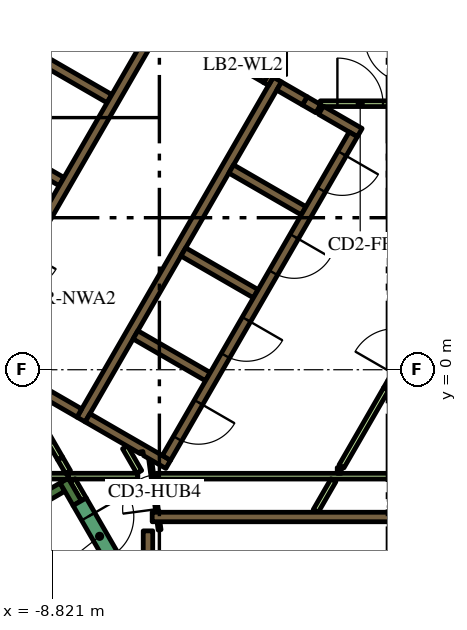
"""IFC4 building model, lengths in metres.
Left out: names, types, materials, properties, quantities, classifications, styles, units other than length and angle.
Written with IfcOpenShell. Run it as: python <this file> out.ifc"""

import sys

from ifc_helpers import new_model, si_unit, direction, frame, frame_2d, origin, place, context, subcontext, project, spatial, polyline, rectangle, outline, extrude, element, fill, save


model = new_model("IFC4")
c1 = context("Model", 3, precision=1e-05, world=origin(), true_north=direction((0.0, 1.0)))
c2 = subcontext(c1, "Body", "Model", "MODEL_VIEW")
j1 = project(units=[si_unit("LENGTHUNIT", "METRE"), si_unit("PLANEANGLEUNIT", "RADIAN")], contexts=[c1])
p1 = place(None, origin())
s1 = spatial("IfcSite", under=j1, at=p1, CompositionType="ELEMENT")
p2 = place(p1, origin())
s2 = spatial("IfcBuilding", under=s1, at=p2, CompositionType="ELEMENT")
p3 = place(p2, frame((0.0, 0.0, 126.6)))
s3 = spatial("IfcBuildingStorey", under=s2, at=p3, CompositionType="ELEMENT", Elevation=126.6)
p4 = place(p3, frame((-14.268, 0.387, 0.0), z_axis=(0.0, 0.0, 1.0), x_axis=(0.499994617707, 0.866028511231, 0.0)))
e1 = element("IfcWall", 1, at=p4, inside=s3, PredefinedType="SOLIDWALL", context=c2, shape_type="SweptSolid", body=[
    extrude(rectangle(XDim=18.817, YDim=0.9, at=frame_2d((9.409, 0.0))), origin(), (0.0, 0.0, 1.0), 3.9),
])
p5 = place(p3, frame((-14.44, -6.49, 0.0), z_axis=(0.0, 0.0, 1.0), x_axis=(0.866022966069, 0.500004222222, 0.0)))
e2 = element("IfcWall", 2, at=p5, inside=s3, PredefinedType="SOLIDWALL", context=c2, shape_type="SweptSolid", body=[
    extrude(rectangle(XDim=6.8, YDim=0.25, at=frame_2d((3.4, 0.0))), origin(), (0.0, 0.0, 1.0), 3.9),
])
p6 = place(p3, frame((-8.163, -3.511, 0.0), z_axis=(0.0, 0.0, 1.0), x_axis=(-0.500206266495, 0.865906283012, 0.0)))
e3 = element("IfcWall", 3, at=p6, inside=s3, PredefinedType="SOLIDWALL", context=c2, shape_type="SweptSolid", body=[
    extrude(rectangle(XDim=0.684, YDim=0.25, at=frame_2d((0.342, 0.0))), origin(), (0.0, 0.0, 1.0), 3.9),
])
p7 = place(p3, frame((-6.3, -4.24, 0.0), z_axis=(0.0, 0.0, 1.0), x_axis=(0.0, -1.0, 0.0)))
e4 = element("IfcWall", 4, at=p7, inside=s3, PredefinedType="SOLIDWALL", context=c2, shape_type="SweptSolid", body=[
    extrude(rectangle(XDim=2.914, YDim=0.25, at=frame_2d((1.457, 0.0))), origin(), (0.0, 0.0, 1.0), 3.9),
])
p8 = place(p3, frame((-6.19, -3.875, 0.0), z_axis=(0.0, 0.0, 1.0), x_axis=(1.0, 0.0, 0.0)))
e5 = element("IfcWall", 5, at=p8, inside=s3, PredefinedType="SOLIDWALL", context=c2, shape_type="SweptSolid", body=[
    extrude(rectangle(XDim=12.615, YDim=0.25, at=frame_2d((6.307, 0.0))), origin(), (0.0, 0.0, 1.0), 3.9),
])
p9 = place(p3, frame((-8.06, -1.311, 0.0), z_axis=(0.0, 0.0, 1.0), x_axis=(0.50000273126, 0.866023826885, 0.0)))
e6 = element("IfcWall", 6, at=p9, inside=s3, PredefinedType="SOLIDWALL", context=c2, shape_type="SweptSolid", body=[
    extrude(rectangle(XDim=10.33, YDim=0.25, at=frame_2d((5.165, 0.0))), origin(), (0.0, 0.0, 1.0), 3.9),
])
p10 = place(p3, frame((-1.819, 6.87, 0.0), z_axis=(0.0, 0.0, 1.0), x_axis=(-0.866294599386, 0.499533449405, 0.0)))
e7 = element("IfcWall", 7, at=p10, inside=s3, PredefinedType="SOLIDWALL", context=c2, shape_type="SweptSolid", body=[
    extrude(rectangle(XDim=0.41, YDim=0.25, at=frame_2d((0.205, 0.0))), origin(), (0.0, 0.0, 1.0), 3.9),
])
p11 = place(p3, frame((-2.849, 7.465, 0.0), z_axis=(0.0, 0.0, 1.0), x_axis=(0.865955664968, -0.500120771724, 0.0)))
e8 = element("IfcWall", 8, at=p11, inside=s3, PredefinedType="SOLIDWALL", context=c2, shape_type="SweptSolid", body=[
    extrude(rectangle(XDim=0.778, YDim=0.25, at=frame_2d((0.389, 0.0))), origin(), (0.0, 0.0, 1.0), 3.9),
])
p12 = place(p3, frame((-0.728, 6.24, 0.0), z_axis=(0.0, 0.0, 1.0), x_axis=(-0.866002680491, 0.500039355833, 0.0)))
e9 = element("IfcWall", 9, at=p12, inside=s3, PredefinedType="SOLIDWALL", context=c2, shape_type="SweptSolid", body=[
    extrude(rectangle(XDim=1.178, YDim=0.25, at=frame_2d((0.589, 0.0))), origin(), (0.0, 0.0, 1.0), 3.9),
])
for number, where, z_axis, x_axis in (
    (10, (-2.204, 4.182, 0.0), (0.0, 0.0, 1.0), (-0.866, 0.5, 0.0)),
    (11, (-5.369, 3.1, 0.0), (0.0, 0.0, 1.0), (0.866, -0.5, 0.0)),
    (12, (-4.724, -0.182, 0.0), (0.0, 0.0, 1.0), (-0.866, 0.5, 0.0)),
):
    element("IfcWall", number, at=place(p3, frame(where, z_axis=z_axis, x_axis=x_axis)), inside=s3, PredefinedType="SOLIDWALL", context=c2, shape_type="SweptSolid", body=[
        extrude(rectangle(XDim=2.2, YDim=0.25, at=frame_2d((1.1, 0.0))), origin(), (0.0, 0.0, 1.0), 3.9),
    ])
p13 = place(p3, origin())
e13 = element("IfcWall", 13, at=p13, inside=s3, PredefinedType="SOLIDWALL", context=c2, shape_type="SweptSolid", body=[
    extrude(outline(polyline([(-5.922, -2.257), (-5.922, -2.257), (-5.705, -2.382), (-5.83, -2.598), (-6.418, -2.258), (-6.433, -2.153), (-6.433, -2.153), (-6.433, -2.153), (-6.508, -2.163), (-6.508, -2.163), (-6.508, -2.163), (-6.501, -2.21), (-7.952, -1.373), (-7.827, -1.156), (-5.922, -2.257)])), origin(), (0.0, 0.0, 1.0), 3.9),
])
p14 = place(p3, frame((-9.265, -0.471, 0.0), z_axis=(0.0, 0.0, 1.0), x_axis=(0.865954634268, -0.500122556369, 0.0)))
e14 = element("IfcWall", 14, at=p14, inside=s3, PredefinedType="SOLIDWALL", context=c2, shape_type="SweptSolid", body=[
    extrude(rectangle(XDim=1.338, YDim=0.25, at=frame_2d((0.669, 0.0))), origin(), (0.0, 0.0, 1.0), 3.9),
])
e15 = element("IfcWall", 15, at=p13, inside=s3, PredefinedType="SOLIDWALL", context=c2, shape_type="SweptSolid", body=[
    extrude(outline(polyline([(-3.128, 7.481), (-3.259, 7.557), (-3.134, 7.773), (-3.003, 7.698), (-3.128, 7.481)])), origin(), (0.0, 0.0, 1.0), 3.9),
])
for number, where, z_axis, x_axis in (
    (16, (-8.574, 4.95, 0.0), (0.0, 0.0, 1.0), (-0.866, 0.5, 0.0)),
    (17, (-7.314, 7.132, 0.0), (0.0, 0.0, 1.0), (-0.866, 0.5, 0.0)),
):
    element("IfcWall", number, at=place(p3, frame(where, z_axis=z_axis, x_axis=x_axis)), inside=s3, PredefinedType="SOLIDWALL", context=c2, shape_type="SweptSolid", body=[
        extrude(rectangle(XDim=2.2, YDim=0.25, at=frame_2d((1.1, 0.0))), origin(), (0.0, 0.0, 1.0), 3.9),
    ])
p15 = place(p3, frame((-7.959, 10.415, 0.0), z_axis=(0.0, 0.0, 1.0), x_axis=(0.866020958405, -0.500007699544, 0.0)))
e18 = element("IfcWall", 18, at=p15, inside=s3, PredefinedType="SOLIDWALL", context=c2, shape_type="SweptSolid", body=[
    extrude(rectangle(XDim=4.1, YDim=0.25, at=frame_2d((2.05, 0.0))), origin(), (0.0, 0.0, 1.0), 3.9),
])
p16 = place(p3, frame((-8.395, -2.8, 0.0), z_axis=(0.0, 0.0, 1.0), x_axis=(1.0, 0.0, 0.0)))
e19 = element("IfcWall", 19, at=p16, inside=s3, PredefinedType="PARTITIONING", context=c2, shape_type="SweptSolid", body=[
    extrude(rectangle(XDim=1.828, YDim=0.15, at=frame_2d((0.914, 0.0))), origin(), (0.0, 0.0, 1.0), 2.75),
])
p17 = place(p3, frame((-11.115, -2.8, 0.0), z_axis=(0.0, 0.0, 1.0), x_axis=(1.0, 0.0, 0.0)))
e20 = element("IfcWall", 20, at=p17, inside=s3, PredefinedType="PARTITIONING", context=c2, shape_type="SweptSolid", body=[
    extrude(rectangle(XDim=2.708, YDim=0.15, at=frame_2d((1.354, 0.0))), origin(), (0.0, 0.0, 1.0), 2.75),
])
p18 = place(p3, frame((-6.531, -2.689, 0.0), z_axis=(0.0, 0.0, 1.0), x_axis=(-0.499967446111, 0.866044197965, 0.0)))
e21 = element("IfcWall", 21, at=p18, inside=s3, PredefinedType="PARTITIONING", context=c2, shape_type="SweptSolid", body=[
    extrude(rectangle(XDim=0.748, YDim=0.15, at=frame_2d((0.374, 0.0))), origin(), (0.0, 0.0, 1.0), 2.75),
])
p19 = place(p3, frame((-7.99, -3.412, 0.0), z_axis=(0.0, 0.0, 1.0), x_axis=(-0.500193841991, 0.86591346013, 0.0)))
e22 = element("IfcWall", 22, at=p19, inside=s3, PredefinedType="PARTITIONING", context=c2, shape_type="SweptSolid", body=[
    extrude(rectangle(XDim=0.583, YDim=0.15, at=frame_2d((0.292, 0.0))), origin(), (0.0, 0.0, 1.0), 2.75),
])
p20 = place(p3, frame((-8.612, -2.333, 0.0), z_axis=(0.0, 0.0, 1.0), x_axis=(0.500248216681, -0.86588204838, 0.0)))
e23 = element("IfcWall", 23, at=p20, inside=s3, PredefinedType="PARTITIONING", context=c2, shape_type="SweptSolid", body=[
    extrude(rectangle(XDim=0.415, YDim=0.15, at=frame_2d((0.208, 0.0))), origin(), (0.0, 0.0, 1.0), 2.75),
])
p21 = place(p3, frame((-6.086, -2.801, 0.0), z_axis=(0.0, 0.0, 1.0), x_axis=(1.0, 0.0, 0.0)))
e24 = element("IfcWall", 24, at=p21, inside=s3, PredefinedType="PARTITIONING", context=c2, shape_type="SweptSolid", body=[
    extrude(rectangle(XDim=7.524, YDim=0.15, at=frame_2d((3.762, 0.0))), origin(), (0.0, 0.0, 1.0), 2.75),
])
p22 = place(p3, frame((-1.887, -3.718, 0.0), z_axis=(0.0, 0.0, 1.0), x_axis=(0.499842898591, 0.866116087328, 0.0)))
e25 = element("IfcWall", 25, at=p22, inside=s3, PredefinedType="PARTITIONING", context=c2, shape_type="SweptSolid", body=[
    extrude(rectangle(XDim=0.936, YDim=0.15, at=frame_2d((0.468, 0.0))), origin(), (0.0, 0.0, 1.0), 2.75),
])
p23 = place(p3, frame((-1.212, -2.651, 0.0), z_axis=(0.0, 0.0, 1.0), x_axis=(-1.0, 0.0, 0.0)))
e26 = element("IfcWall", 26, at=p23, inside=s3, PredefinedType="PARTITIONING", context=c2, shape_type="SweptSolid", body=[
    extrude(rectangle(XDim=0.108, YDim=0.15, at=frame_2d((0.054, 0.0))), origin(), (0.0, 0.0, 1.0), 2.75),
])
p24 = place(p3, frame((-1.208, -2.544, 0.0), z_axis=(0.0, 0.0, 1.0), x_axis=(0.499995339376, 0.86602809458, 0.0)))
e27 = element("IfcWall", 27, at=p24, inside=s3, PredefinedType="PARTITIONING", context=c2, shape_type="SweptSolid", body=[
    extrude(rectangle(XDim=2.349, YDim=0.15, at=frame_2d((1.175, 0.0))), origin(), (0.0, 0.0, 1.0), 2.75),
])
p25 = place(p3, frame((-6.008, 9.144, 0.0), z_axis=(0.0, 0.0, 1.0), x_axis=(-0.500006956611, -0.866021387346, 0.0)))
e28 = element("IfcWall", 28, at=p25, inside=s3, PredefinedType="SOLIDWALL", context=c2, shape_type="SweptSolid", body=[
    extrude(rectangle(XDim=9.83, YDim=0.25, at=frame_2d((4.915, 0.0))), origin(), (0.0, 0.0, 1.0), 3.9),
])
p26 = place(p25, frame((6.985, 0.0, 0.0)))
e29 = element("IfcOpeningElement", 29, at=p26, cuts=e28, PredefinedType="OPENING", context=c2, shape_type="SweptSolid", body=[
    extrude(rectangle(XDim=0.9, YDim=2.1, at=frame_2d((0.45, 1.05))), frame((0.0, 0.135, 0.0), z_axis=(0.0, -1.0, 0.0), x_axis=(1.0, 0.0, 0.0)), (0.0, 0.0, 1.0), 0.27),
])
p27 = place(p3, frame((-0.898, 6.194, 0.0), z_axis=(0.0, 0.0, 1.0), x_axis=(-0.499996202215, -0.866027596426, 0.0)))
e30 = element("IfcWall", 30, at=p27, inside=s3, PredefinedType="SOLIDWALL", context=c2, shape_type="SweptSolid", body=[
    extrude(rectangle(XDim=9.83, YDim=0.25, at=frame_2d((4.915, 0.0))), origin(), (0.0, 0.0, 1.0), 3.9),
])
p28 = place(p27, frame((0.585, 0.0, 0.0)))
e31 = element("IfcOpeningElement", 31, at=p28, cuts=e30, PredefinedType="OPENING", context=c2, shape_type="SweptSolid", body=[
    extrude(rectangle(XDim=1.1, YDim=2.1, at=frame_2d((0.55, 1.05))), frame((0.0, 0.135, 0.0), z_axis=(0.0, -1.0, 0.0), x_axis=(1.0, 0.0, 0.0)), (0.0, 0.0, 1.0), 0.27),
])
p29 = place(p27, frame((3.105, 0.0, 0.0)))
e32 = element("IfcOpeningElement", 32, at=p29, cuts=e30, PredefinedType="OPENING", context=c2, shape_type="SweptSolid", body=[
    extrude(rectangle(XDim=1.1, YDim=2.1, at=frame_2d((0.55, 1.05))), frame((0.0, 0.135, 0.0), z_axis=(0.0, -1.0, 0.0), x_axis=(1.0, 0.0, 0.0)), (0.0, 0.0, 1.0), 0.27),
])
p30 = place(p27, frame((5.625, 0.0, 0.0)))
e33 = element("IfcOpeningElement", 33, at=p30, cuts=e30, PredefinedType="OPENING", context=c2, shape_type="SweptSolid", body=[
    extrude(rectangle(XDim=1.1, YDim=2.1, at=frame_2d((0.55, 1.05))), frame((0.0, 0.135, 0.0), z_axis=(0.0, -1.0, 0.0), x_axis=(1.0, 0.0, 0.0)), (0.0, 0.0, 1.0), 0.27),
])
p31 = place(p27, frame((8.145, 0.0, 0.0)))
e34 = element("IfcOpeningElement", 34, at=p31, cuts=e30, PredefinedType="OPENING", context=c2, shape_type="SweptSolid", body=[
    extrude(rectangle(XDim=1.1, YDim=2.1, at=frame_2d((0.55, 1.05))), frame((0.0, 0.135, 0.0), z_axis=(0.0, -1.0, 0.0), x_axis=(1.0, 0.0, 0.0)), (0.0, 0.0, 1.0), 0.27),
])
p32 = place(p3, frame((-8.098, -3.474, 0.0), z_axis=(0.0, 0.0, 1.0), x_axis=(0.49994051562, -0.866059744384, 0.0)))
e35 = element("IfcWall", 35, at=p32, inside=s3, PredefinedType="SOLIDWALL", context=c2, shape_type="SweptSolid", body=[
    extrude(rectangle(XDim=2.1, YDim=0.4, at=frame_2d((1.05, 0.0))), origin(), (0.0, 0.0, 1.0), 3.9),
])
p33 = place(p32, frame((0.45, 0.0, 0.0)))
e36 = element("IfcOpeningElement", 36, at=p33, cuts=e35, PredefinedType="OPENING", context=c2, shape_type="SweptSolid", body=[
    extrude(rectangle(XDim=1.2, YDim=2.1, at=frame_2d((0.6, 1.05))), frame((0.0, 0.21, 0.0), z_axis=(0.0, -1.0, 0.0), x_axis=(1.0, 0.0, 0.0)), (0.0, 0.0, 1.0), 0.42),
])
p34 = place(p3, frame((-1.765, 7.0, 0.0), z_axis=(0.0, 0.0, 1.0), x_axis=(1.0, 0.0, 0.0)))
e37 = element("IfcWall", 37, at=p34, inside=s3, PredefinedType="PARTITIONING", context=c2, shape_type="SweptSolid", body=[
    extrude(rectangle(XDim=2.1, YDim=0.15, at=frame_2d((1.05, 0.0))), origin(), (0.0, 0.0, 1.0), 2.75),
])
p35 = place(p34, frame((0.45, 0.0, 0.0)))
e38 = element("IfcOpeningElement", 38, at=p35, cuts=e37, PredefinedType="OPENING", context=c2, shape_type="SweptSolid", body=[
    extrude(rectangle(XDim=1.2, YDim=2.1, at=frame_2d((0.6, 1.05))), frame((0.0, 0.085, 0.0), z_axis=(0.0, -1.0, 0.0), x_axis=(1.0, 0.0, 0.0)), (0.0, 0.0, 1.0), 0.17),
])
p36 = place(p3, frame((-0.034, -0.509, 0.0), z_axis=(0.0, 0.0, 1.0), x_axis=(0.49994051562, 0.866059744384, 0.0)))
e39 = element("IfcWall", 39, at=p36, inside=s3, PredefinedType="PARTITIONING", context=c2, shape_type="SweptSolid", body=[
    extrude(rectangle(XDim=2.1, YDim=0.15, at=frame_2d((1.05, 0.0))), origin(), (0.0, 0.0, 1.0), 2.75),
])
p37 = place(p36, frame((0.45, 0.0, 0.0)))
e40 = element("IfcOpeningElement", 40, at=p37, cuts=e39, PredefinedType="OPENING", context=c2, shape_type="SweptSolid", body=[
    extrude(rectangle(XDim=1.2, YDim=2.1, at=frame_2d((0.6, 1.05))), frame((0.0, 0.085, 0.0), z_axis=(0.0, -1.0, 0.0), x_axis=(1.0, 0.0, 0.0)), (0.0, 0.0, 1.0), 0.17),
])
p38 = place(p3, frame((-5.995, -4.213, 0.0), z_axis=(0.0, 0.0, 1.0), x_axis=(-0.132072335448, 0.991240081014, 0.0)))
e41 = element("IfcWall", 41, at=p38, inside=s3, PredefinedType="PARTITIONING", context=c2, shape_type="SweptSolid", body=[
    extrude(rectangle(XDim=2.1, YDim=0.076, at=frame_2d((1.05, 0.0))), origin(), (0.0, 0.0, 1.0), 2.75),
])
p39 = place(p38, frame((0.55, 0.0, 0.0)))
e42 = element("IfcOpeningElement", 42, at=p39, cuts=e41, PredefinedType="OPENING", context=c2, shape_type="SweptSolid", body=[
    extrude(rectangle(XDim=0.9, YDim=2.1, at=frame_2d((0.45, 1.05))), frame((0.0, 0.048, 0.0), z_axis=(0.0, -1.0, 0.0), x_axis=(1.0, 0.0, 0.0)), (0.0, 0.0, 1.0), 0.096),
])
p40 = place(p3, frame((-4.409, 8.365, 0.0), z_axis=(0.0, 0.0, 1.0), x_axis=(0.866034573852, -0.49998411664, 0.0)))
e43 = element("IfcWall", 43, at=p40, inside=s3, PredefinedType="SOLIDWALL", context=c2, shape_type="SweptSolid", body=[
    extrude(rectangle(XDim=1.4, YDim=0.25, at=frame_2d((0.7, 0.0))), origin(), (0.0, 0.0, 1.0), 3.9),
])
p41 = place(p40, frame((0.1, 0.0, 0.0)))
e44 = element("IfcOpeningElement", 44, at=p41, cuts=e43, PredefinedType="OPENING", context=c2, shape_type="SweptSolid", body=[
    extrude(rectangle(XDim=1.2, YDim=2.1, at=frame_2d((0.6, 1.05))), frame((0.0, 0.135, 0.0), z_axis=(0.0, -1.0, 0.0), x_axis=(1.0, 0.0, 0.0)), (0.0, 0.0, 1.0), 0.27),
])
p42 = place(p3, frame((-8.612, -2.333, 0.0), z_axis=(0.0, 0.0, 1.0), x_axis=(-0.499961193289, 0.866047807691, 0.0)))
e45 = element("IfcWall", 45, at=p42, inside=s3, PredefinedType="PARTITIONING", context=c2, shape_type="SweptSolid", body=[
    extrude(rectangle(XDim=1.8, YDim=0.15, at=frame_2d((0.9, 0.0))), origin(), (0.0, 0.0, 1.0), 2.75),
])
p43 = place(p42, frame((0.45, 0.0, 0.0)))
e46 = element("IfcOpeningElement", 46, at=p43, cuts=e45, PredefinedType="OPENING", context=c2, shape_type="SweptSolid", body=[
    extrude(rectangle(XDim=0.9, YDim=2.1, at=frame_2d((0.45, 1.05))), frame((0.0, 0.085, 0.0), z_axis=(0.0, -1.0, 0.0), x_axis=(1.0, 0.0, 0.0)), (0.0, 0.0, 1.0), 0.17),
])
p44 = place(p3, frame((-19.081, -3.9, 0.0), z_axis=(0.0, 0.0, 1.0), x_axis=(0.499998313975, 0.866026377209, 0.0)))
e47 = element("IfcWall", 47, at=p44, inside=s3, PredefinedType="PARTITIONING", context=c2, shape_type="SweptSolid", body=[
    extrude(rectangle(XDim=25.766, YDim=0.15, at=frame_2d((12.883, 0.0))), origin(), (0.0, 0.0, 1.0), 2.75),
])
p45 = place(p44, frame((19.306, 0.0, 0.0)))
e48 = element("IfcOpeningElement", 48, at=p45, cuts=e47, PredefinedType="OPENING", context=c2, shape_type="SweptSolid", body=[
    extrude(rectangle(XDim=1.0, YDim=2.1, at=frame_2d((0.5, 1.05))), frame((0.0, 0.085, 0.0), z_axis=(0.0, -1.0, 0.0), x_axis=(1.0, 0.0, 0.0)), (0.0, 0.0, 1.0), 0.17),
])
p46 = place(p44, frame((18.0, 0.0, 0.0)))
e49 = element("IfcOpeningElement", 49, at=p46, cuts=e47, PredefinedType="OPENING", context=c2, shape_type="SweptSolid", body=[
    extrude(rectangle(XDim=1.0, YDim=2.1, at=frame_2d((0.5, 1.05))), frame((0.0, 0.085, 0.0), z_axis=(0.0, -1.0, 0.0), x_axis=(1.0, 0.0, 0.0)), (0.0, 0.0, 1.0), 0.17),
])
p47 = place(p44, frame((7.793, 0.0, 0.0)))
e50 = element("IfcOpeningElement", 50, at=p47, cuts=e47, PredefinedType="OPENING", context=c2, shape_type="SweptSolid", body=[
    extrude(rectangle(XDim=0.9, YDim=2.1, at=frame_2d((0.45, 1.05))), frame((0.0, 0.085, 0.0), z_axis=(0.0, -1.0, 0.0), x_axis=(1.0, 0.0, 0.0)), (0.0, 0.0, 1.0), 0.17),
])
p48 = place(p44, frame((4.674, 0.0, 0.0)))
e51 = element("IfcOpeningElement", 51, at=p48, cuts=e47, PredefinedType="OPENING", context=c2, shape_type="SweptSolid", body=[
    extrude(rectangle(XDim=0.9, YDim=2.1, at=frame_2d((0.45, 1.05))), frame((0.0, 0.085, 0.0), z_axis=(0.0, -1.0, 0.0), x_axis=(1.0, 0.0, 0.0)), (0.0, 0.0, 1.0), 0.17),
])
p49 = place(p44, frame((0.18, 0.0, 0.0)))
e52 = element("IfcOpeningElement", 52, at=p49, cuts=e47, PredefinedType="OPENING", context=c2, shape_type="SweptSolid", body=[
    extrude(rectangle(XDim=1.0, YDim=2.1, at=frame_2d((0.5, 1.05))), frame((0.0, 0.085, 0.0), z_axis=(0.0, -1.0, 0.0), x_axis=(1.0, 0.0, 0.0)), (0.0, 0.0, 1.0), 0.17),
])
p50 = place(p28, origin())
e53 = element("IfcDoor", 53, at=p50, inside=s3, OperationType="DOUBLE_DOOR_SLIDING", PredefinedType="DOOR", context=c2, shape_type="SweptSolid", body=[
    extrude(rectangle(XDim=1.1, YDim=2.1, at=frame_2d((0.55, 1.05))), frame((0.0, 0.025, 0.0), z_axis=(0.0, -1.0, 0.0), x_axis=(1.0, 0.0, 0.0)), (0.0, 0.0, 1.0), 0.05),
])
fill(e31, e53)
p51 = place(p29, origin())
e54 = element("IfcDoor", 54, at=p51, inside=s3, OperationType="DOUBLE_DOOR_SLIDING", PredefinedType="DOOR", context=c2, shape_type="SweptSolid", body=[
    extrude(rectangle(XDim=1.1, YDim=2.1, at=frame_2d((0.55, 1.05))), frame((0.0, 0.025, 0.0), z_axis=(0.0, -1.0, 0.0), x_axis=(1.0, 0.0, 0.0)), (0.0, 0.0, 1.0), 0.05),
])
fill(e32, e54)
p52 = place(p30, origin())
e55 = element("IfcDoor", 55, at=p52, inside=s3, OperationType="DOUBLE_DOOR_SLIDING", PredefinedType="DOOR", context=c2, shape_type="SweptSolid", body=[
    extrude(rectangle(XDim=1.1, YDim=2.1, at=frame_2d((0.55, 1.05))), frame((0.0, 0.025, 0.0), z_axis=(0.0, -1.0, 0.0), x_axis=(1.0, 0.0, 0.0)), (0.0, 0.0, 1.0), 0.05),
])
fill(e33, e55)
p53 = place(p31, origin())
e56 = element("IfcDoor", 56, at=p53, inside=s3, OperationType="DOUBLE_DOOR_SLIDING", PredefinedType="DOOR", context=c2, shape_type="SweptSolid", body=[
    extrude(rectangle(XDim=1.1, YDim=2.1, at=frame_2d((0.55, 1.05))), frame((0.0, 0.025, 0.0), z_axis=(0.0, -1.0, 0.0), x_axis=(1.0, 0.0, 0.0)), (0.0, 0.0, 1.0), 0.05),
])
fill(e34, e56)
p54 = place(p33, origin())
e57 = element("IfcDoor", 57, at=p54, inside=s3, OperationType="SINGLE_SWING_LEFT", PredefinedType="DOOR", context=c2, shape_type="SweptSolid", body=[
    extrude(rectangle(XDim=1.2, YDim=2.1, at=frame_2d((0.6, 1.05))), frame((0.0, 0.025, 0.0), z_axis=(0.0, -1.0, 0.0), x_axis=(1.0, 0.0, 0.0)), (0.0, 0.0, 1.0), 0.05),
])
fill(e36, e57)
p55 = place(p35, origin())
e58 = element("IfcDoor", 58, at=p55, inside=s3, OperationType="SINGLE_SWING_LEFT", PredefinedType="DOOR", context=c2, shape_type="SweptSolid", body=[
    extrude(rectangle(XDim=1.2, YDim=2.1, at=frame_2d((0.6, 1.05))), frame((0.0, 0.025, 0.0), z_axis=(0.0, -1.0, 0.0), x_axis=(1.0, 0.0, 0.0)), (0.0, 0.0, 1.0), 0.05),
])
fill(e38, e58)
p56 = place(p39, origin())
e59 = element("IfcDoor", 59, at=p56, inside=s3, OperationType="SINGLE_SWING_LEFT", PredefinedType="DOOR", context=c2, shape_type="SweptSolid", body=[
    extrude(rectangle(XDim=0.9, YDim=2.1, at=frame_2d((0.45, 1.05))), frame((0.0, 0.025, 0.0), z_axis=(0.0, -1.0, 0.0), x_axis=(1.0, 0.0, 0.0)), (0.0, 0.0, 1.0), 0.05),
])
fill(e42, e59)
p57 = place(p41, origin())
e60 = element("IfcDoor", 60, at=p57, inside=s3, OperationType="SINGLE_SWING_LEFT", PredefinedType="DOOR", context=c2, shape_type="SweptSolid", body=[
    extrude(rectangle(XDim=1.2, YDim=2.1, at=frame_2d((0.6, 1.05))), frame((0.0, 0.025, 0.0), z_axis=(0.0, -1.0, 0.0), x_axis=(1.0, 0.0, 0.0)), (0.0, 0.0, 1.0), 0.05),
])
fill(e44, e60)
p58 = place(p43, origin())
e61 = element("IfcDoor", 61, at=p58, inside=s3, OperationType="SINGLE_SWING_LEFT", PredefinedType="DOOR", context=c2, shape_type="SweptSolid", body=[
    extrude(rectangle(XDim=0.9, YDim=2.1, at=frame_2d((0.45, 1.05))), frame((0.0, 0.025, 0.0), z_axis=(0.0, -1.0, 0.0), x_axis=(1.0, 0.0, 0.0)), (0.0, 0.0, 1.0), 0.05),
])
fill(e46, e61)
save(model, sys.argv[1])
